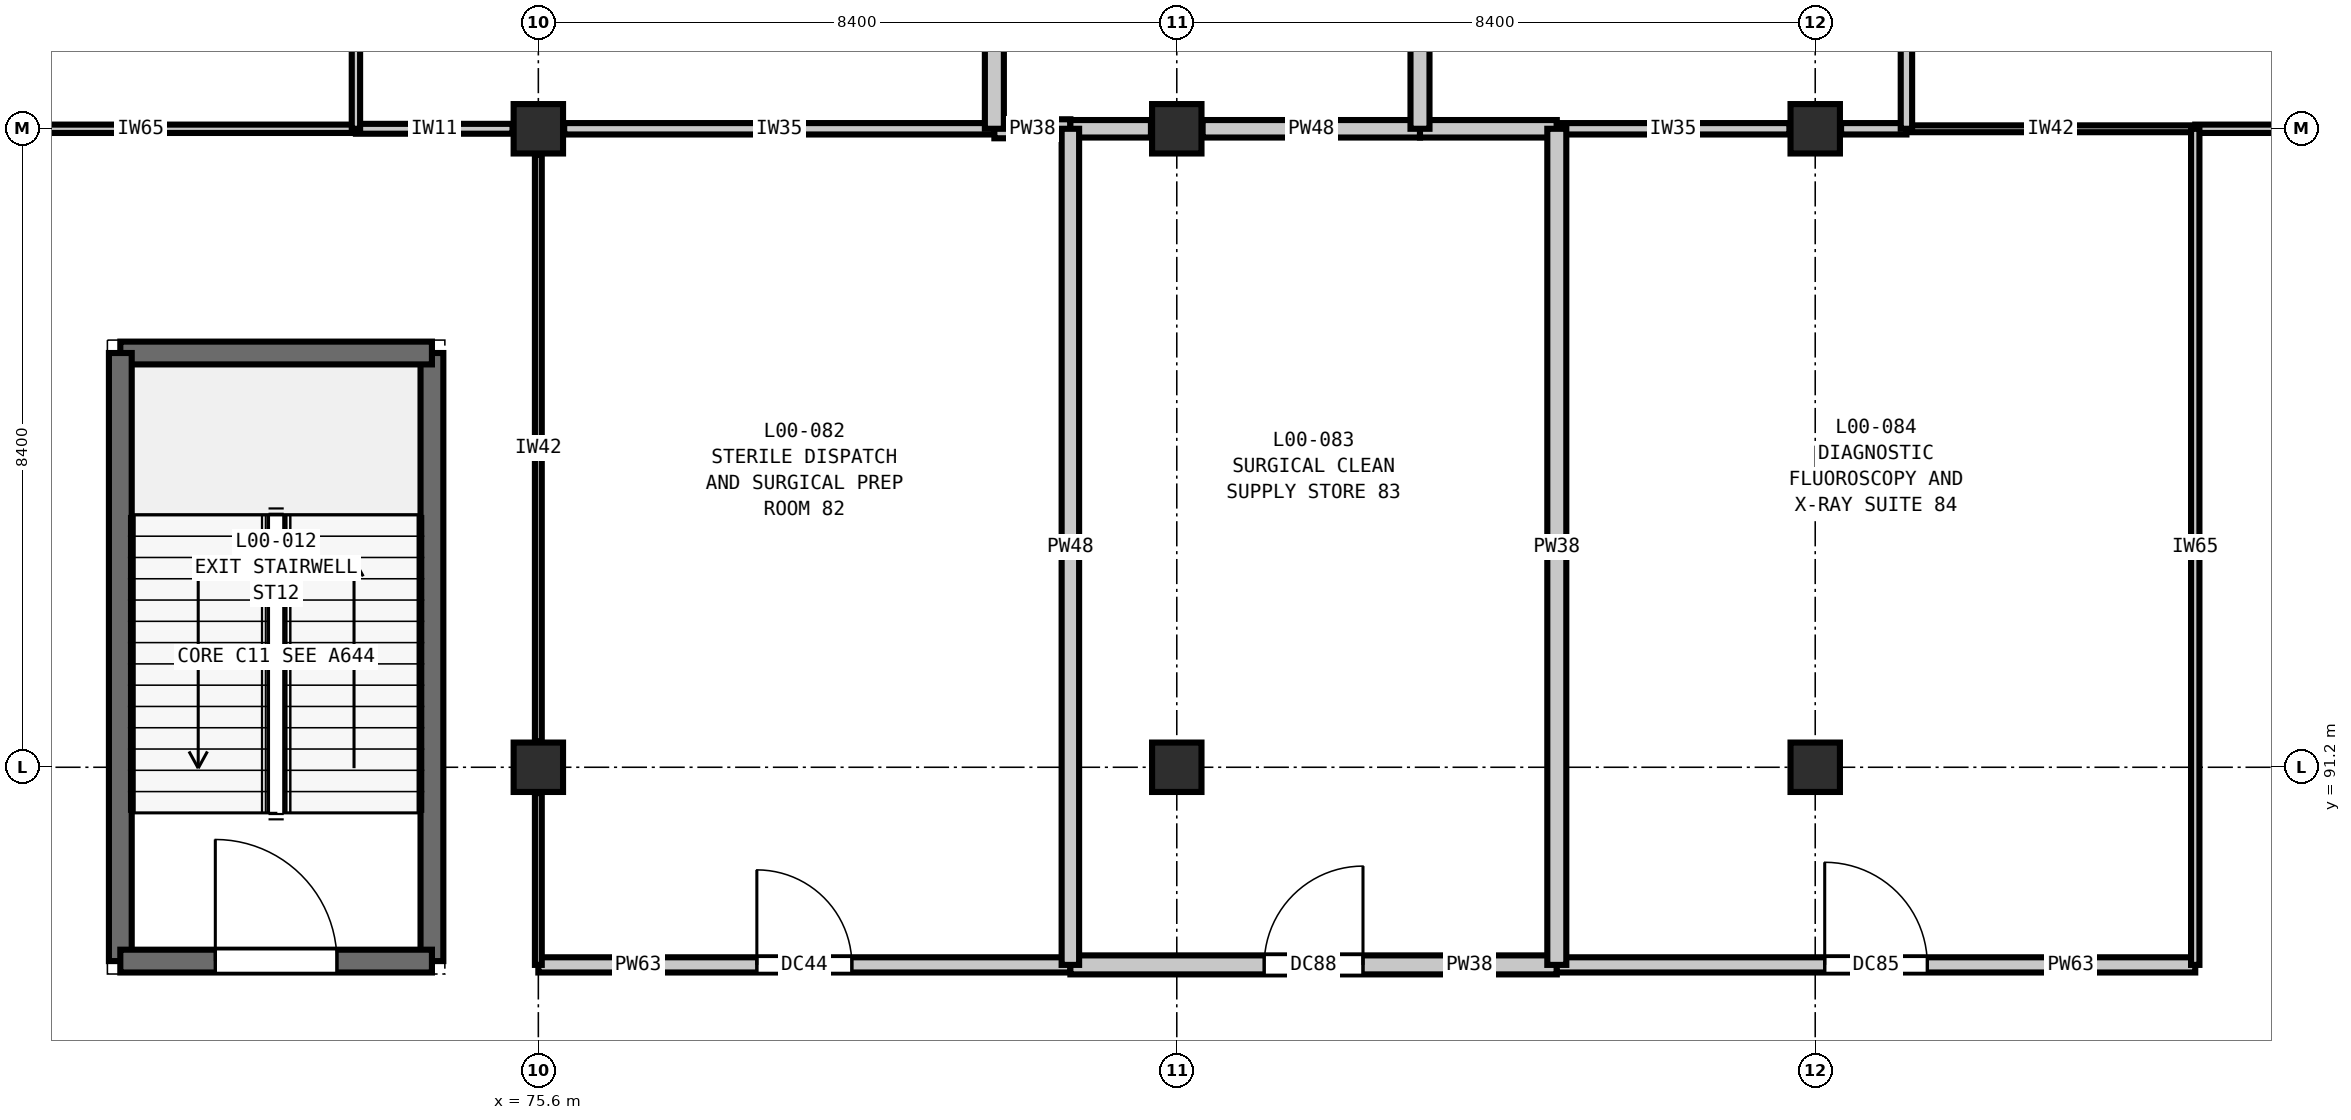
"""IFC4 building model, lengths in metres.
Left out: names, types, materials, properties, quantities, classifications, styles, units other than length and angle.
Written with IfcOpenShell. Run it as: python <this file> out.ifc"""

import sys

from ifc_helpers import new_model, si_unit, direction, frame, frame_2d, origin, origin_2d, place, context, subcontext, project, spatial, rectangle, extrude, element, fill, save


model = new_model("IFC4")
c1 = context("Model", 3, precision=1e-05, world=origin(), true_north=direction((0.0, 1.0)))
c2 = subcontext(c1, "Body", "Model", "MODEL_VIEW")
j1 = project(units=[si_unit("LENGTHUNIT", "METRE"), si_unit("PLANEANGLEUNIT", "RADIAN")], contexts=[c1])
p1 = place(None, origin())
s1 = spatial("IfcSite", under=j1, at=p1, CompositionType="ELEMENT")
p2 = place(p1, origin())
s2 = spatial("IfcBuilding", under=s1, at=p2, CompositionType="ELEMENT")
p3 = place(p2, origin())
s3 = spatial("IfcBuildingStorey", under=s2, at=p3, CompositionType="ELEMENT", Elevation=0.0)
for number, where, z_axis, x_axis in (
    (1, (75.6, 91.2, 0.0), (0.0, 0.0, 1.0), (1.0, 0.0, 0.0)),
    (2, (75.6, 99.6, 0.0), (0.0, 0.0, 1.0), (1.0, 0.0, 0.0)),
    (3, (84.0, 91.2, 0.0), (0.0, 0.0, 1.0), (1.0, 0.0, 0.0)),
    (4, (84.0, 99.6, 0.0), (0.0, 0.0, 1.0), (1.0, 0.0, 0.0)),
    (5, (92.4, 91.2, 0.0), (0.0, 0.0, 1.0), (1.0, 0.0, 0.0)),
    (6, (92.4, 99.6, 0.0), (0.0, 0.0, 1.0), (1.0, 0.0, 0.0)),
):
    element("IfcColumn", number, at=place(p3, frame(where, z_axis=z_axis, x_axis=x_axis)), inside=s3, PredefinedType="COLUMN", context=c2, shape_type="SweptSolid", body=[
        extrude(rectangle(XDim=0.65, YDim=0.65, at=origin_2d()), origin(), (0.0, 0.0, 1.0), 5.4),
    ])
p4 = place(p3, frame((74.2, 88.65, 0.0), z_axis=(0.0, 0.0, 1.0), x_axis=(0.0, 1.0, 0.0)))
e7 = element("IfcWall", 7, at=p4, inside=s3, PredefinedType="SHEAR", context=c2, shape_type="SweptSolid", body=[
    extrude(rectangle(XDim=8.0, YDim=0.3, at=frame_2d((4.0, 0.0))), origin(), (0.0, 0.0, 1.0), 5.4),
])
p5 = place(p3, frame((74.2, 96.65, 0.0), z_axis=(0.0, 0.0, 1.0), x_axis=(-1.0, 0.0, 0.0)))
e8 = element("IfcWall", 8, at=p5, inside=s3, PredefinedType="SHEAR", context=c2, shape_type="SweptSolid", body=[
    extrude(rectangle(XDim=4.1, YDim=0.3, at=frame_2d((2.05, 0.0))), origin(), (0.0, 0.0, 1.0), 5.4),
])
p6 = place(p3, frame((70.1, 96.65, 0.0), z_axis=(0.0, 0.0, 1.0), x_axis=(0.0, -1.0, 0.0)))
e9 = element("IfcWall", 9, at=p6, inside=s3, PredefinedType="SHEAR", context=c2, shape_type="SweptSolid", body=[
    extrude(rectangle(XDim=8.0, YDim=0.3, at=frame_2d((4.0, 0.0))), origin(), (0.0, 0.0, 1.0), 5.4),
])
p7 = place(p3, frame((70.1, 88.65, 0.0), z_axis=(0.0, 0.0, 1.0), x_axis=(1.0, 0.0, 0.0)))
e10 = element("IfcWall", 10, at=p7, inside=s3, PredefinedType="SHEAR", context=c2, shape_type="SweptSolid", body=[
    extrude(rectangle(XDim=4.1, YDim=0.3, at=frame_2d((2.05, 0.0))), origin(), (0.0, 0.0, 1.0), 5.4),
])
p8 = place(p7, frame((1.25, 0.0, 0.0)))
e11 = element("IfcOpeningElement", 11, at=p8, cuts=e10, PredefinedType="OPENING", context=c2, shape_type="SweptSolid", body=[
    extrude(rectangle(XDim=1.6, YDim=2.25, at=frame_2d((0.8, 1.125))), frame((0.0, 0.16, 0.0), z_axis=(0.0, -1.0, 0.0), x_axis=(1.0, 0.0, 0.0)), (0.0, 0.0, 1.0), 0.32),
])
p9 = place(p3, frame((75.6, 88.6, 0.0), z_axis=(0.0, 0.0, 1.0), x_axis=(1.0, 0.0, 0.0)))
e12 = element("IfcWall", 12, at=p9, inside=s3, PredefinedType="PARTITIONING", context=c2, shape_type="SweptSolid", body=[
    extrude(rectangle(XDim=7.0, YDim=0.2, at=frame_2d((3.5, 0.0))), origin(), (0.0, 0.0, 1.0), 5.04),
])
p10 = place(p9, frame((2.875, 0.0, 0.0)))
e13 = element("IfcOpeningElement", 13, at=p10, cuts=e12, PredefinedType="OPENING", context=c2, shape_type="SweptSolid", body=[
    extrude(rectangle(XDim=1.25, YDim=2.15, at=frame_2d((0.625, 1.075))), frame((0.0, 0.11, 0.0), z_axis=(0.0, -1.0, 0.0), x_axis=(1.0, 0.0, 0.0)), (0.0, 0.0, 1.0), 0.22),
])
p11 = place(p3, frame((82.6, 88.6, 0.0), z_axis=(0.0, 0.0, 1.0), x_axis=(1.0, 0.0, 0.0)))
e14 = element("IfcWall", 14, at=p11, inside=s3, PredefinedType="PARTITIONING", context=c2, shape_type="SweptSolid", body=[
    extrude(rectangle(XDim=6.4, YDim=0.25, at=frame_2d((3.2, 0.0))), origin(), (0.0, 0.0, 1.0), 5.04),
])
p12 = place(p11, frame((2.55, 0.0, 0.0)))
e15 = element("IfcOpeningElement", 15, at=p12, cuts=e14, PredefinedType="OPENING", context=c2, shape_type="SweptSolid", body=[
    extrude(rectangle(XDim=1.3, YDim=2.2, at=frame_2d((0.65, 1.1))), frame((0.0, 0.135, 0.0), z_axis=(0.0, -1.0, 0.0), x_axis=(1.0, 0.0, 0.0)), (0.0, 0.0, 1.0), 0.27),
])
p13 = place(p3, frame((89.0, 88.6, 0.0), z_axis=(0.0, 0.0, 1.0), x_axis=(1.0, 0.0, 0.0)))
e16 = element("IfcWall", 16, at=p13, inside=s3, PredefinedType="PARTITIONING", context=c2, shape_type="SweptSolid", body=[
    extrude(rectangle(XDim=8.4, YDim=0.2, at=frame_2d((4.2, 0.0))), origin(), (0.0, 0.0, 1.0), 5.04),
])
p14 = place(p13, frame((3.525, 0.0, 0.0)))
e17 = element("IfcOpeningElement", 17, at=p14, cuts=e16, PredefinedType="OPENING", context=c2, shape_type="SweptSolid", body=[
    extrude(rectangle(XDim=1.35, YDim=2.2, at=frame_2d((0.675, 1.1))), frame((0.0, 0.11, 0.0), z_axis=(0.0, -1.0, 0.0), x_axis=(1.0, 0.0, 0.0)), (0.0, 0.0, 1.0), 0.22),
])
p15 = place(p3, frame((67.54, 99.6, 0.0), z_axis=(0.0, 0.0, 1.0), x_axis=(1.0, 0.0, 0.0)))
e18 = element("IfcWall", 18, at=p15, inside=s3, PredefinedType="PARTITIONING", context=c2, shape_type="SweptSolid", body=[
    extrude(rectangle(XDim=5.66, YDim=0.11, at=frame_2d((2.83, 0.0))), origin(), (0.0, 0.0, 1.0), 4.635),
])
p16 = place(p3, frame((73.2, 99.6, 0.0), z_axis=(0.0, 0.0, 1.0), x_axis=(1.0, 0.0, 0.0)))
e19 = element("IfcWall", 19, at=p16, inside=s3, PredefinedType="PARTITIONING", context=c2, shape_type="SweptSolid", body=[
    extrude(rectangle(XDim=2.06, YDim=0.13, at=frame_2d((1.03, 0.0))), origin(), (0.0, 0.0, 1.0), 4.635),
])
p17 = place(p3, frame((75.94, 99.6, 0.0), z_axis=(0.0, 0.0, 1.0), x_axis=(1.0, 0.0, 0.0)))
e20 = element("IfcWall", 20, at=p17, inside=s3, PredefinedType="PARTITIONING", context=c2, shape_type="SweptSolid", body=[
    extrude(rectangle(XDim=5.66, YDim=0.15, at=frame_2d((2.83, 0.0))), origin(), (0.0, 0.0, 1.0), 4.635),
])
p18 = place(p3, frame((81.6, 99.6, 0.0), z_axis=(0.0, 0.0, 1.0), x_axis=(1.0, 0.0, 0.0)))
e21 = element("IfcWall", 21, at=p18, inside=s3, PredefinedType="PARTITIONING", context=c2, shape_type="SweptSolid", body=[
    extrude(rectangle(XDim=1.0, YDim=0.25, at=frame_2d((0.5, 0.0))), origin(), (0.0, 0.0, 1.0), 4.635),
])
p19 = place(p3, frame((84.34, 99.6, 0.0), z_axis=(0.0, 0.0, 1.0), x_axis=(1.0, 0.0, 0.0)))
e22 = element("IfcWall", 22, at=p19, inside=s3, PredefinedType="PARTITIONING", context=c2, shape_type="SweptSolid", body=[
    extrude(rectangle(XDim=2.86, YDim=0.23, at=frame_2d((1.43, 0.0))), origin(), (0.0, 0.0, 1.0), 4.635),
])
p20 = place(p3, frame((82.6, 99.6, 0.0), z_axis=(0.0, 0.0, 1.0), x_axis=(1.0, 0.0, 0.0)))
e23 = element("IfcWall", 23, at=p20, inside=s3, PredefinedType="PARTITIONING", context=c2, shape_type="SweptSolid", body=[
    extrude(rectangle(XDim=1.06, YDim=0.23, at=frame_2d((0.53, 0.0))), origin(), (0.0, 0.0, 1.0), 4.635),
])
p21 = place(p3, frame((87.2, 99.6, 0.0), z_axis=(0.0, 0.0, 1.0), x_axis=(1.0, 0.0, 0.0)))
e24 = element("IfcWall", 24, at=p21, inside=s3, PredefinedType="PARTITIONING", context=c2, shape_type="SweptSolid", body=[
    extrude(rectangle(XDim=1.8, YDim=0.23, at=frame_2d((0.9, 0.0))), origin(), (0.0, 0.0, 1.0), 4.635),
])
p22 = place(p3, frame((89.0, 99.6, 0.0), z_axis=(0.0, 0.0, 1.0), x_axis=(1.0, 0.0, 0.0)))
e25 = element("IfcWall", 25, at=p22, inside=s3, PredefinedType="PARTITIONING", context=c2, shape_type="SweptSolid", body=[
    extrude(rectangle(XDim=3.06, YDim=0.15, at=frame_2d((1.53, 0.0))), origin(), (0.0, 0.0, 1.0), 4.635),
])
p23 = place(p3, frame((92.74, 99.6, 0.0), z_axis=(0.0, 0.0, 1.0), x_axis=(1.0, 0.0, 0.0)))
e26 = element("IfcWall", 26, at=p23, inside=s3, PredefinedType="PARTITIONING", context=c2, shape_type="SweptSolid", body=[
    extrude(rectangle(XDim=0.86, YDim=0.15, at=frame_2d((0.43, 0.0))), origin(), (0.0, 0.0, 1.0), 4.635),
])
p24 = place(p3, frame((93.6, 99.6, 0.0), z_axis=(0.0, 0.0, 1.0), x_axis=(1.0, 0.0, 0.0)))
e27 = element("IfcWall", 27, at=p24, inside=s3, PredefinedType="PARTITIONING", context=c2, shape_type="SweptSolid", body=[
    extrude(rectangle(XDim=3.8, YDim=0.09, at=frame_2d((1.9, 0.0))), origin(), (0.0, 0.0, 1.0), 4.635),
])
p25 = place(p3, frame((97.4, 99.6, 0.0), z_axis=(0.0, 0.0, 1.0), x_axis=(1.0, 0.0, 0.0)))
e28 = element("IfcWall", 28, at=p25, inside=s3, PredefinedType="PARTITIONING", context=c2, shape_type="SweptSolid", body=[
    extrude(rectangle(XDim=3.06, YDim=0.11, at=frame_2d((1.53, 0.0))), origin(), (0.0, 0.0, 1.0), 4.635),
])
p26 = place(p3, frame((73.2, 99.6, 0.0), z_axis=(0.0, 0.0, 1.0), x_axis=(0.0, 1.0, 0.0)))
e29 = element("IfcWall", 29, at=p26, inside=s3, PredefinedType="PARTITIONING", context=c2, shape_type="SweptSolid", body=[
    extrude(rectangle(XDim=3.6, YDim=0.11, at=frame_2d((1.8, 0.0))), origin(), (0.0, 0.0, 1.0), 5.04),
])
p27 = place(p3, frame((75.6, 91.54, 0.0), z_axis=(0.0, 0.0, 1.0), x_axis=(0.0, 1.0, 0.0)))
e30 = element("IfcWall", 30, at=p27, inside=s3, PredefinedType="PARTITIONING", context=c2, shape_type="SweptSolid", body=[
    extrude(rectangle(XDim=7.72, YDim=0.09, at=frame_2d((3.86, 0.0))), origin(), (0.0, 0.0, 1.0), 4.685),
])
p28 = place(p3, frame((75.6, 88.6, 0.0), z_axis=(0.0, 0.0, 1.0), x_axis=(0.0, 1.0, 0.0)))
e31 = element("IfcWall", 31, at=p28, inside=s3, PredefinedType="PARTITIONING", context=c2, shape_type="SweptSolid", body=[
    extrude(rectangle(XDim=2.26, YDim=0.09, at=frame_2d((1.13, 0.0))), origin(), (0.0, 0.0, 1.0), 4.685),
])
p29 = place(p3, frame((81.6, 99.6, 0.0), z_axis=(0.0, 0.0, 1.0), x_axis=(0.0, 1.0, 0.0)))
e32 = element("IfcWall", 32, at=p29, inside=s3, PredefinedType="PARTITIONING", context=c2, shape_type="SweptSolid", body=[
    extrude(rectangle(XDim=3.6, YDim=0.25, at=frame_2d((1.8, 0.0))), origin(), (0.0, 0.0, 1.0), 5.04),
])
p30 = place(p3, frame((82.6, 88.6, 0.0), z_axis=(0.0, 0.0, 1.0), x_axis=(0.0, 1.0, 0.0)))
e33 = element("IfcWall", 33, at=p30, inside=s3, PredefinedType="PARTITIONING", context=c2, shape_type="SweptSolid", body=[
    extrude(rectangle(XDim=11.0, YDim=0.23, at=frame_2d((5.5, 0.0))), origin(), (0.0, 0.0, 1.0), 5.04),
])
p31 = place(p3, frame((87.2, 99.6, 0.0), z_axis=(0.0, 0.0, 1.0), x_axis=(0.0, 1.0, 0.0)))
e34 = element("IfcWall", 34, at=p31, inside=s3, PredefinedType="PARTITIONING", context=c2, shape_type="SweptSolid", body=[
    extrude(rectangle(XDim=3.6, YDim=0.25, at=frame_2d((1.8, 0.0))), origin(), (0.0, 0.0, 1.0), 5.04),
])
p32 = place(p3, frame((89.0, 88.6, 0.0), z_axis=(0.0, 0.0, 1.0), x_axis=(0.0, 1.0, 0.0)))
e35 = element("IfcWall", 35, at=p32, inside=s3, PredefinedType="PARTITIONING", context=c2, shape_type="SweptSolid", body=[
    extrude(rectangle(XDim=11.0, YDim=0.25, at=frame_2d((5.5, 0.0))), origin(), (0.0, 0.0, 1.0), 5.04),
])
p33 = place(p3, frame((93.6, 99.6, 0.0), z_axis=(0.0, 0.0, 1.0), x_axis=(0.0, 1.0, 0.0)))
e36 = element("IfcWall", 36, at=p33, inside=s3, PredefinedType="PARTITIONING", context=c2, shape_type="SweptSolid", body=[
    extrude(rectangle(XDim=3.6, YDim=0.15, at=frame_2d((1.8, 0.0))), origin(), (0.0, 0.0, 1.0), 5.04),
])
p34 = place(p3, frame((97.4, 88.6, 0.0), z_axis=(0.0, 0.0, 1.0), x_axis=(0.0, 1.0, 0.0)))
e37 = element("IfcWall", 37, at=p34, inside=s3, PredefinedType="PARTITIONING", context=c2, shape_type="SweptSolid", body=[
    extrude(rectangle(XDim=11.0, YDim=0.11, at=frame_2d((5.5, 0.0))), origin(), (0.0, 0.0, 1.0), 5.04),
])
p35 = place(p8, origin())
e38 = element("IfcDoor", 38, at=p35, inside=s3, OperationType="SINGLE_SWING_LEFT", PredefinedType="DOOR", context=c2, shape_type="SweptSolid", body=[
    extrude(rectangle(XDim=1.6, YDim=2.25, at=frame_2d((0.8, 1.125))), frame((0.0, 0.025, 0.0), z_axis=(0.0, -1.0, 0.0), x_axis=(1.0, 0.0, 0.0)), (0.0, 0.0, 1.0), 0.05),
])
fill(e11, e38)
p36 = place(p10, origin())
e39 = element("IfcDoor", 39, at=p36, inside=s3, OperationType="SINGLE_SWING_LEFT", PredefinedType="DOOR", context=c2, shape_type="SweptSolid", body=[
    extrude(rectangle(XDim=1.25, YDim=2.15, at=frame_2d((0.625, 1.075))), frame((0.0, 0.025, 0.0), z_axis=(0.0, -1.0, 0.0), x_axis=(1.0, 0.0, 0.0)), (0.0, 0.0, 1.0), 0.05),
])
fill(e13, e39)
p37 = place(p12, origin())
e40 = element("IfcDoor", 40, at=p37, inside=s3, OperationType="SINGLE_SWING_RIGHT", PredefinedType="DOOR", context=c2, shape_type="SweptSolid", body=[
    extrude(rectangle(XDim=1.3, YDim=2.2, at=frame_2d((0.65, 1.1))), frame((0.0, 0.025, 0.0), z_axis=(0.0, -1.0, 0.0), x_axis=(1.0, 0.0, 0.0)), (0.0, 0.0, 1.0), 0.05),
])
fill(e15, e40)
p38 = place(p14, origin())
e41 = element("IfcDoor", 41, at=p38, inside=s3, OperationType="SINGLE_SWING_LEFT", PredefinedType="DOOR", context=c2, shape_type="SweptSolid", body=[
    extrude(rectangle(XDim=1.35, YDim=2.2, at=frame_2d((0.675, 1.1))), frame((0.0, 0.025, 0.0), z_axis=(0.0, -1.0, 0.0), x_axis=(1.0, 0.0, 0.0)), (0.0, 0.0, 1.0), 0.05),
])
fill(e17, e41)
save(model, sys.argv[1])
